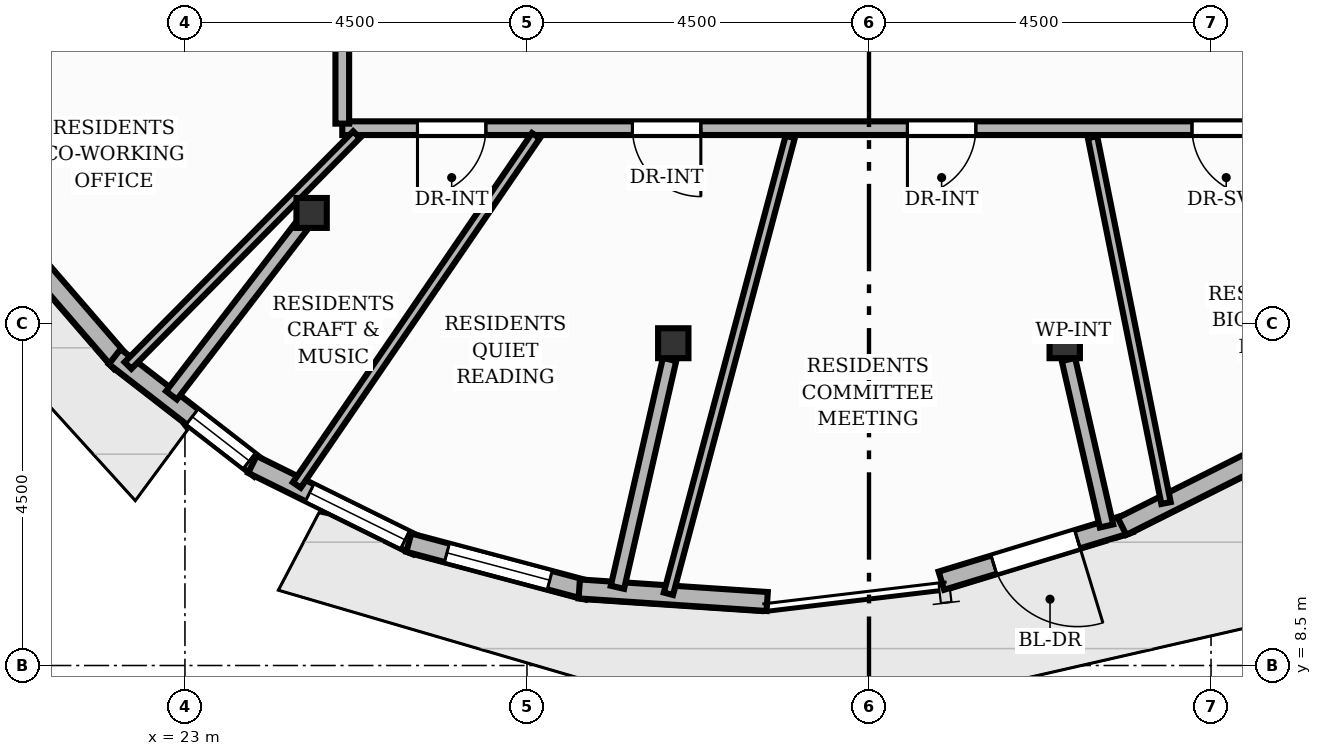
"""IFC4 building model, lengths in metres.
Left out: names, types, materials, properties, quantities, classifications, styles, units other than length and angle.
Written with IfcOpenShell. Run it as: python <this file> out.ifc"""

import sys

from ifc_helpers import new_model, si_unit, direction, frame, frame_2d, origin, origin_2d, place, context, subcontext, project, spatial, rectangle, i_section, extrude, element, fill, save


model = new_model("IFC4")
c1 = context("Model", 3, precision=1e-05, world=origin(), true_north=direction((0.0, 1.0)))
c2 = subcontext(c1, "Body", "Model", "MODEL_VIEW")
j1 = project(units=[si_unit("LENGTHUNIT", "METRE"), si_unit("PLANEANGLEUNIT", "RADIAN")], contexts=[c1])
p1 = place(None, origin())
s1 = spatial("IfcSite", under=j1, at=p1, CompositionType="ELEMENT")
p2 = place(p1, origin())
s2 = spatial("IfcBuilding", under=s1, at=p2, CompositionType="ELEMENT")
p3 = place(p2, frame((0.0, 0.0, 230.24)))
s3 = spatial("IfcBuildingStorey", under=s2, at=p3, CompositionType="ELEMENT", Elevation=230.24)
for number, where, z_axis, x_axis in (
    (1, (24.667, 14.455, 0.0), (0.0, 0.0, 1.0), (1.0, 0.0, 0.0)),
    (2, (29.425, 12.74, 0.0), (0.0, 0.0, 1.0), (1.0, 0.0, 0.0)),
    (3, (34.575, 12.74, 0.0), (0.0, 0.0, 1.0), (1.0, 0.0, 0.0)),
):
    element("IfcColumn", number, at=place(p3, frame(where, z_axis=z_axis, x_axis=x_axis)), inside=s3, PredefinedType="COLUMN", context=c2, shape_type="SweptSolid", body=[
        extrude(i_section(OverallWidth=0.399, OverallDepth=0.394, WebThickness=0.023, FlangeThickness=0.037, at=origin_2d()), origin(), (0.0, 0.0, 1.0), 3.2),
    ])
p4 = place(p3, frame((22.159, 12.486, 0.0), z_axis=(0.0, 0.0, 1.0), x_axis=(-0.653838956375, 0.756633741732, 0.0)))
e4 = element("IfcWall", 4, at=p4, inside=s3, PredefinedType="SOLIDWALL", context=c2, shape_type="SweptSolid", body=[
    extrude(rectangle(XDim=2.437, YDim=0.25, at=frame_2d((1.218, 0.0))), origin(), (0.0, 0.0, 1.0), 2.96),
])
p5 = place(p3, frame((23.985, 11.085, 0.0), z_axis=(0.0, 0.0, 1.0), x_axis=(-0.790325704793, 0.612686935019, 0.0)))
e5 = element("IfcWall", 5, at=p5, inside=s3, PredefinedType="SOLIDWALL", context=c2, shape_type="SweptSolid", body=[
    extrude(rectangle(XDim=2.415, YDim=0.25, at=frame_2d((1.208, 0.0))), origin(), (0.0, 0.0, 1.0), 2.96),
])
p6 = place(p5, frame((0.175, 0.0, 0.85)))
e6 = element("IfcOpeningElement", 6, at=p6, cuts=e5, PredefinedType="OPENING", context=c2, shape_type="SweptSolid", body=[
    extrude(rectangle(XDim=0.95, YDim=1.45, at=frame_2d((0.475, 0.725))), frame((0.0, 0.135, 0.0), z_axis=(0.0, -1.0, 0.0), x_axis=(1.0, 0.0, 0.0)), (0.0, 0.0, 1.0), 0.27),
])
p7 = place(p3, frame((26.052, 10.076, 0.0), z_axis=(0.0, 0.0, 1.0), x_axis=(-0.896540415167, 0.442961944158, 0.0)))
e7 = element("IfcWall", 7, at=p7, inside=s3, PredefinedType="SOLIDWALL", context=c2, shape_type="SweptSolid", body=[
    extrude(rectangle(XDim=2.415, YDim=0.25, at=frame_2d((1.207, 0.0))), origin(), (0.0, 0.0, 1.0), 2.96),
])
p8 = place(p7, frame((0.175, 0.0, 0.85)))
e8 = element("IfcOpeningElement", 8, at=p8, cuts=e7, PredefinedType="OPENING", context=c2, shape_type="SweptSolid", body=[
    extrude(rectangle(XDim=1.4, YDim=1.55, at=frame_2d((0.7, 0.775))), frame((0.0, 0.135, 0.0), z_axis=(0.0, -1.0, 0.0), x_axis=(1.0, 0.0, 0.0)), (0.0, 0.0, 1.0), 0.27),
])
p9 = place(p3, frame((28.3, 9.489, 0.0), z_axis=(0.0, 0.0, 1.0), x_axis=(-0.96631636381, 0.257357115761, 0.0)))
e9 = element("IfcWall", 9, at=p9, inside=s3, PredefinedType="SOLIDWALL", context=c2, shape_type="SweptSolid", body=[
    extrude(rectangle(XDim=2.437, YDim=0.25, at=frame_2d((1.219, 0.0))), origin(), (0.0, 0.0, 1.0), 2.96),
])
p10 = place(p9, frame((0.518, 0.0, 0.85)))
e10 = element("IfcOpeningElement", 10, at=p10, cuts=e9, PredefinedType="OPENING", context=c2, shape_type="SweptSolid", body=[
    extrude(rectangle(XDim=1.4, YDim=1.55, at=frame_2d((0.7, 0.775))), frame((0.0, 0.135, 0.0), z_axis=(0.0, -1.0, 0.0), x_axis=(1.0, 0.0, 0.0)), (0.0, 0.0, 1.0), 0.27),
])
p11 = place(p3, frame((30.66, 9.342, 0.0), z_axis=(0.0, 0.0, 1.0), x_axis=(-0.997759800667, 0.06689828228, 0.0)))
e11 = element("IfcWall", 11, at=p11, inside=s3, PredefinedType="SOLIDWALL", context=c2, shape_type="SweptSolid", body=[
    extrude(rectangle(XDim=2.478, YDim=0.25, at=frame_2d((1.239, 0.0))), origin(), (0.0, 0.0, 1.0), 2.96),
])
p12 = place(p3, frame((35.432, 10.372, 0.0), z_axis=(0.0, 0.0, 1.0), x_axis=(-0.956515193001, -0.291682508145, 0.0)))
e12 = element("IfcWall", 12, at=p12, inside=s3, PredefinedType="SOLIDWALL", context=c2, shape_type="SweptSolid", body=[
    extrude(rectangle(XDim=2.592, YDim=0.25, at=frame_2d((1.296, 0.0))), origin(), (0.0, 0.0, 1.0), 2.96),
])
p13 = place(p12, frame((0.721, 0.0, 0.0)))
e13 = element("IfcOpeningElement", 13, at=p13, cuts=e12, PredefinedType="OPENING", context=c2, shape_type="SweptSolid", body=[
    extrude(rectangle(XDim=1.15, YDim=2.2, at=frame_2d((0.575, 1.1))), frame((0.0, 0.135, 0.0), z_axis=(0.0, -1.0, 0.0), x_axis=(1.0, 0.0, 0.0)), (0.0, 0.0, 1.0), 0.27),
])
p14 = place(p3, frame((37.699, 11.519, 0.0), z_axis=(0.0, 0.0, 1.0), x_axis=(-0.893929345503, -0.448207904045, 0.0)))
e14 = element("IfcWall", 14, at=p14, inside=s3, PredefinedType="SOLIDWALL", context=c2, shape_type="SweptSolid", body=[
    extrude(rectangle(XDim=2.651, YDim=0.25, at=frame_2d((1.326, 0.0))), origin(), (0.0, 0.0, 1.0), 2.96),
])
p15 = place(p3, frame((24.533, 14.281, 0.0), z_axis=(0.0, 0.0, 1.0), x_axis=(-0.609243973043, -0.792982837967, 0.0)))
e15 = element("IfcWall", 15, at=p15, inside=s3, PredefinedType="PARTITIONING", context=c2, shape_type="SweptSolid", body=[
    extrude(rectangle(XDim=2.806, YDim=0.18, at=frame_2d((1.403, 0.0))), origin(), (0.0, 0.0, 1.0), 2.403),
])
p16 = place(p3, frame((29.376, 12.527, 0.0), z_axis=(0.0, 0.0, 1.0), x_axis=(-0.223020975075, -0.974813646128, 0.0)))
e16 = element("IfcWall", 16, at=p16, inside=s3, PredefinedType="PARTITIONING", context=c2, shape_type="SweptSolid", body=[
    extrude(rectangle(XDim=3.075, YDim=0.18, at=frame_2d((1.538, 0.0))), origin(), (0.0, 0.0, 1.0), 2.403),
])
p17 = place(p3, frame((34.624, 12.527, 0.0), z_axis=(0.0, 0.0, 1.0), x_axis=(0.223034234637, -0.974810612468, 0.0)))
e17 = element("IfcWall", 17, at=p17, inside=s3, PredefinedType="PARTITIONING", context=c2, shape_type="SweptSolid", body=[
    extrude(rectangle(XDim=2.247, YDim=0.18, at=frame_2d((1.124, 0.0))), origin(), (0.0, 0.0, 1.0), 2.403),
])
p18 = place(p3, frame((38.93, 15.57, 0.0), z_axis=(0.0, 0.0, 1.0), x_axis=(-1.0, 0.0, 0.0)))
e18 = element("IfcWall", 18, at=p18, inside=s3, PredefinedType="PARTITIONING", context=c2, shape_type="SweptSolid", body=[
    extrude(rectangle(XDim=13.86, YDim=0.18, at=frame_2d((6.93, 0.0))), origin(), (0.0, 0.0, 1.0), 2.955),
])
p19 = place(p18, frame((1.781, 0.0, 0.0)))
e19 = element("IfcOpeningElement", 19, at=p19, cuts=e18, PredefinedType="OPENING", context=c2, shape_type="SweptSolid", body=[
    extrude(rectangle(XDim=0.9, YDim=2.1, at=frame_2d((0.45, 1.05))), frame((0.0, 0.1, 0.0), z_axis=(0.0, -1.0, 0.0), x_axis=(1.0, 0.0, 0.0)), (0.0, 0.0, 1.0), 0.2),
])
p20 = place(p18, frame((5.524, 0.0, 0.0)))
e20 = element("IfcOpeningElement", 20, at=p20, cuts=e18, PredefinedType="OPENING", context=c2, shape_type="SweptSolid", body=[
    extrude(rectangle(XDim=0.9, YDim=2.1, at=frame_2d((0.45, 1.05))), frame((0.0, 0.1, 0.0), z_axis=(0.0, -1.0, 0.0), x_axis=(1.0, 0.0, 0.0)), (0.0, 0.0, 1.0), 0.2),
])
p21 = place(p18, frame((9.143, 0.0, 0.0)))
e21 = element("IfcOpeningElement", 21, at=p21, cuts=e18, PredefinedType="OPENING", context=c2, shape_type="SweptSolid", body=[
    extrude(rectangle(XDim=0.9, YDim=2.1, at=frame_2d((0.45, 1.05))), frame((0.0, 0.1, 0.0), z_axis=(0.0, -1.0, 0.0), x_axis=(1.0, 0.0, 0.0)), (0.0, 0.0, 1.0), 0.2),
])
p22 = place(p18, frame((11.97, 0.0, 0.0)))
e22 = element("IfcOpeningElement", 22, at=p22, cuts=e18, PredefinedType="OPENING", context=c2, shape_type="SweptSolid", body=[
    extrude(rectangle(XDim=0.9, YDim=2.1, at=frame_2d((0.45, 1.05))), frame((0.0, 0.1, 0.0), z_axis=(0.0, -1.0, 0.0), x_axis=(1.0, 0.0, 0.0)), (0.0, 0.0, 1.0), 0.2),
])
p23 = place(p3, frame((25.07, 15.63, 0.0), z_axis=(0.0, 0.0, 1.0), x_axis=(0.0, 1.0, 0.0)))
e23 = element("IfcWall", 23, at=p23, inside=s3, PredefinedType="PARTITIONING", context=c2, shape_type="SweptSolid", body=[
    extrude(rectangle(XDim=5.909, YDim=0.18, at=frame_2d((2.954, 0.0))), origin(), (0.0, 0.0, 1.0), 2.955),
])
p24 = place(p23, frame((1.731, 0.0, 0.0)))
e24 = element("IfcOpeningElement", 24, at=p24, cuts=e23, PredefinedType="OPENING", context=c2, shape_type="SweptSolid", body=[
    extrude(rectangle(XDim=0.9, YDim=2.1, at=frame_2d((0.45, 1.05))), frame((0.0, 0.1, 0.0), z_axis=(0.0, -1.0, 0.0), x_axis=(1.0, 0.0, 0.0)), (0.0, 0.0, 1.0), 0.2),
])
p25 = place(p3, frame((35.908, 10.638, 0.0), z_axis=(0.0, 0.0, 1.0), x_axis=(-0.196928748325, 0.980417802818, 0.0)))
e25 = element("IfcWall", 25, at=p25, inside=s3, PredefinedType="PARTITIONING", context=c2, shape_type="SweptSolid", body=[
    extrude(rectangle(XDim=4.911, YDim=0.125, at=frame_2d((2.455, 0.0))), origin(), (0.0, 0.0, 1.0), 2.955),
])
p26 = place(p3, frame((29.361, 9.444, 0.0), z_axis=(0.0, 0.0, 1.0), x_axis=(0.257643106476, 0.966240151145, 0.0)))
e26 = element("IfcWall", 26, at=p26, inside=s3, PredefinedType="PARTITIONING", context=c2, shape_type="SweptSolid", body=[
    extrude(rectangle(XDim=6.22, YDim=0.125, at=frame_2d((3.11, 0.0))), origin(), (0.0, 0.0, 1.0), 2.955),
])
p27 = place(p3, frame((24.471, 10.874, 0.0), z_axis=(0.0, 0.0, 1.0), x_axis=(0.564753044296, 0.825259958412, 0.0)))
e27 = element("IfcWall", 27, at=p27, inside=s3, PredefinedType="PARTITIONING", context=c2, shape_type="SweptSolid", body=[
    extrude(rectangle(XDim=5.571, YDim=0.125, at=frame_2d((2.785, 0.0))), origin(), (0.0, 0.0, 1.0), 2.692),
])
p28 = place(p3, frame((22.251, 12.448, 0.0), z_axis=(0.0, 0.0, 1.0), x_axis=(0.7036132626, 0.710583124408, 0.0)))
e28 = element("IfcWall", 28, at=p28, inside=s3, PredefinedType="PARTITIONING", context=c2, shape_type="SweptSolid", body=[
    extrude(rectangle(XDim=4.273, YDim=0.125, at=frame_2d((2.137, 0.0))), origin(), (0.0, 0.0, 1.0), 2.403),
])
p29 = place(p13, origin())
e29 = element("IfcDoor", 29, at=p29, inside=s3, OperationType="SINGLE_SWING_LEFT", PredefinedType="DOOR", context=c2, shape_type="SweptSolid", body=[
    extrude(rectangle(XDim=1.15, YDim=2.2, at=frame_2d((0.575, 1.1))), frame((0.0, 0.025, 0.0), z_axis=(0.0, -1.0, 0.0), x_axis=(1.0, 0.0, 0.0)), (0.0, 0.0, 1.0), 0.05),
])
fill(e13, e29)
p30 = place(p6, origin())
e30 = element("IfcWindow", 30, at=p30, inside=s3, PartitioningType="SINGLE_PANEL", PredefinedType="WINDOW", context=c2, shape_type="SweptSolid", body=[
    extrude(rectangle(XDim=0.95, YDim=1.45, at=frame_2d((0.475, 0.725))), frame((0.0, 0.03, 0.0), z_axis=(0.0, -1.0, 0.0), x_axis=(1.0, 0.0, 0.0)), (0.0, 0.0, 1.0), 0.06),
])
fill(e6, e30)
p31 = place(p8, origin())
e31 = element("IfcWindow", 31, at=p31, inside=s3, PartitioningType="SINGLE_PANEL", PredefinedType="WINDOW", context=c2, shape_type="SweptSolid", body=[
    extrude(rectangle(XDim=1.4, YDim=1.55, at=frame_2d((0.7, 0.775))), frame((0.0, 0.03, 0.0), z_axis=(0.0, -1.0, 0.0), x_axis=(1.0, 0.0, 0.0)), (0.0, 0.0, 1.0), 0.06),
])
fill(e8, e31)
p32 = place(p10, origin())
e32 = element("IfcWindow", 32, at=p32, inside=s3, PartitioningType="SINGLE_PANEL", PredefinedType="WINDOW", context=c2, shape_type="SweptSolid", body=[
    extrude(rectangle(XDim=1.4, YDim=1.55, at=frame_2d((0.7, 0.775))), frame((0.0, 0.03, 0.0), z_axis=(0.0, -1.0, 0.0), x_axis=(1.0, 0.0, 0.0)), (0.0, 0.0, 1.0), 0.06),
])
fill(e10, e32)
p33 = place(p19, origin())
e33 = element("IfcDoor", 33, at=p33, inside=s3, OperationType="SINGLE_SWING_LEFT", PredefinedType="DOOR", context=c2, shape_type="SweptSolid", body=[
    extrude(rectangle(XDim=0.9, YDim=2.1, at=frame_2d((0.45, 1.05))), frame((0.0, 0.025, 0.0), z_axis=(0.0, -1.0, 0.0), x_axis=(1.0, 0.0, 0.0)), (0.0, 0.0, 1.0), 0.05),
])
fill(e19, e33)
p34 = place(p20, origin())
e34 = element("IfcDoor", 34, at=p34, inside=s3, OperationType="SINGLE_SWING_RIGHT", PredefinedType="DOOR", context=c2, shape_type="SweptSolid", body=[
    extrude(rectangle(XDim=0.9, YDim=2.1, at=frame_2d((0.45, 1.05))), frame((0.0, 0.025, 0.0), z_axis=(0.0, -1.0, 0.0), x_axis=(1.0, 0.0, 0.0)), (0.0, 0.0, 1.0), 0.05),
])
fill(e20, e34)
p35 = place(p21, origin())
e35 = element("IfcDoor", 35, at=p35, inside=s3, OperationType="SINGLE_SWING_LEFT", PredefinedType="DOOR", context=c2, shape_type="SweptSolid", body=[
    extrude(rectangle(XDim=0.9, YDim=2.1, at=frame_2d((0.45, 1.05))), frame((0.0, 0.025, 0.0), z_axis=(0.0, -1.0, 0.0), x_axis=(1.0, 0.0, 0.0)), (0.0, 0.0, 1.0), 0.05),
])
fill(e21, e35)
p36 = place(p22, origin())
e36 = element("IfcDoor", 36, at=p36, inside=s3, OperationType="SINGLE_SWING_RIGHT", PredefinedType="DOOR", context=c2, shape_type="SweptSolid", body=[
    extrude(rectangle(XDim=0.9, YDim=2.1, at=frame_2d((0.45, 1.05))), frame((0.0, 0.025, 0.0), z_axis=(0.0, -1.0, 0.0), x_axis=(1.0, 0.0, 0.0)), (0.0, 0.0, 1.0), 0.05),
])
fill(e22, e36)
save(model, sys.argv[1])
